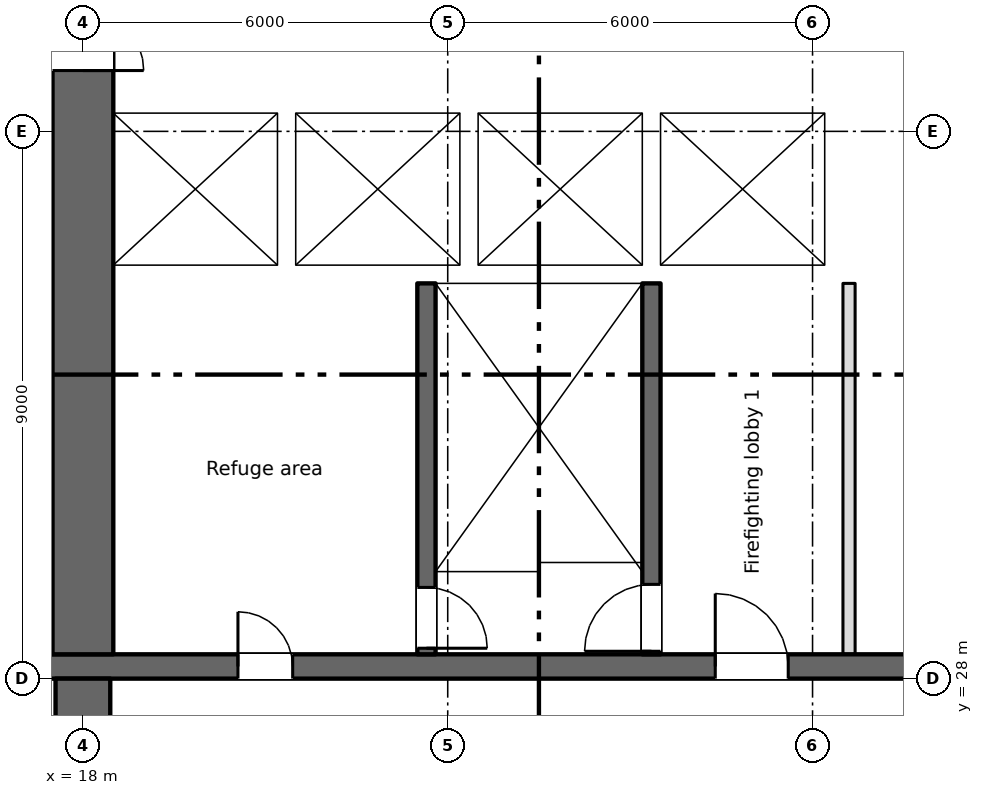
"""IFC4 building model, lengths in metres.
Left out: names, types, materials, properties, quantities, classifications, styles, units other than length and angle.
Written with IfcOpenShell. Run it as: python <this file> out.ifc"""

import sys

from ifc_helpers import new_model, si_unit, direction, frame, frame_2d, origin, place, context, subcontext, project, spatial, rectangle, extrude, element, fill, save


model = new_model("IFC4")
c1 = context("Model", 3, precision=1e-05, world=origin(), true_north=direction((0.0, 1.0)))
c2 = subcontext(c1, "Body", "Model", "MODEL_VIEW")
j1 = project(units=[si_unit("LENGTHUNIT", "METRE"), si_unit("PLANEANGLEUNIT", "RADIAN")], contexts=[c1])
p1 = place(None, origin())
s1 = spatial("IfcSite", under=j1, at=p1, CompositionType="ELEMENT")
p2 = place(p1, origin())
s2 = spatial("IfcBuilding", under=s1, at=p2, CompositionType="ELEMENT")
p3 = place(p2, frame((0.0, 0.0, 90.0)))
s3 = spatial("IfcBuildingStorey", under=s2, at=p3, CompositionType="ELEMENT", Elevation=90.0)
p4 = place(p3, frame((18.0, 1.4, 0.0), z_axis=(0.0, 0.0, 1.0), x_axis=(0.0, 1.0, 0.0)))
e1 = element("IfcWall", 1, at=p4, inside=s3, PredefinedType="SHEAR", context=c2, shape_type="SweptSolid", body=[
    extrude(rectangle(XDim=26.6, YDim=0.9, at=frame_2d((13.3, 0.0))), origin(), (0.0, 0.0, 1.0), 4.2),
])
p5 = place(p4, frame((24.5, 0.0, 0.0)))
e2 = element("IfcOpeningElement", 2, at=p5, cuts=e1, PredefinedType="OPENING", context=c2, shape_type="SweptSolid", body=[
    extrude(rectangle(XDim=1.2, YDim=2.1, at=frame_2d((0.6, 1.05))), frame((0.0, 0.46, 0.0), z_axis=(0.0, -1.0, 0.0), x_axis=(1.0, 0.0, 0.0)), (0.0, 0.0, 1.0), 0.92),
])
p6 = place(p3, frame((6.7, 28.2, 0.0), z_axis=(0.0, 0.0, 1.0), x_axis=(1.0, 0.0, 0.0)))
e3 = element("IfcWall", 3, at=p6, inside=s3, PredefinedType="SHEAR", context=c2, shape_type="SweptSolid", body=[
    extrude(rectangle(XDim=57.8, YDim=0.4, at=frame_2d((28.9, 0.0))), origin(), (0.0, 0.0, 1.0), 4.2),
])
p7 = place(p6, frame((13.85, 0.0, 0.0)))
e4 = element("IfcOpeningElement", 4, at=p7, cuts=e3, PredefinedType="OPENING", context=c2, shape_type="SweptSolid", body=[
    extrude(rectangle(XDim=0.9, YDim=2.1, at=frame_2d((0.45, 1.05))), frame((0.0, 0.21, 0.0), z_axis=(0.0, -1.0, 0.0), x_axis=(1.0, 0.0, 0.0)), (0.0, 0.0, 1.0), 0.42),
])
p8 = place(p6, frame((49.85, 0.0, 0.0)))
e5 = element("IfcOpeningElement", 5, at=p8, cuts=e3, PredefinedType="OPENING", context=c2, shape_type="SweptSolid", body=[
    extrude(rectangle(XDim=0.9, YDim=2.1, at=frame_2d((0.45, 1.05))), frame((0.0, 0.21, 0.0), z_axis=(0.0, -1.0, 0.0), x_axis=(1.0, 0.0, 0.0)), (0.0, 0.0, 1.0), 0.42),
])
p9 = place(p6, frame((1.35, 0.0, 0.0)))
e6 = element("IfcOpeningElement", 6, at=p9, cuts=e3, PredefinedType="OPENING", context=c2, shape_type="SweptSolid", body=[
    extrude(rectangle(XDim=0.9, YDim=2.1, at=frame_2d((0.45, 1.05))), frame((0.0, 0.21, 0.0), z_axis=(0.0, -1.0, 0.0), x_axis=(1.0, 0.0, 0.0)), (0.0, 0.0, 1.0), 0.42),
])
p10 = place(p6, frame((4.7, 0.0, 0.0)))
e7 = element("IfcOpeningElement", 7, at=p10, cuts=e3, PredefinedType="OPENING", context=c2, shape_type="SweptSolid", body=[
    extrude(rectangle(XDim=1.2, YDim=2.1, at=frame_2d((0.6, 1.05))), frame((0.0, 0.21, 0.0), z_axis=(0.0, -1.0, 0.0), x_axis=(1.0, 0.0, 0.0)), (0.0, 0.0, 1.0), 0.42),
])
p11 = place(p6, frame((31.7, 0.0, 0.0)))
e8 = element("IfcOpeningElement", 8, at=p11, cuts=e3, PredefinedType="OPENING", context=c2, shape_type="SweptSolid", body=[
    extrude(rectangle(XDim=1.2, YDim=2.1, at=frame_2d((0.6, 1.05))), frame((0.0, 0.21, 0.0), z_axis=(0.0, -1.0, 0.0), x_axis=(1.0, 0.0, 0.0)), (0.0, 0.0, 1.0), 0.42),
])
p12 = place(p6, frame((55.2, 0.0, 0.0)))
e9 = element("IfcOpeningElement", 9, at=p12, cuts=e3, PredefinedType="OPENING", context=c2, shape_type="SweptSolid", body=[
    extrude(rectangle(XDim=1.2, YDim=2.1, at=frame_2d((0.6, 1.05))), frame((0.0, 0.21, 0.0), z_axis=(0.0, -1.0, 0.0), x_axis=(1.0, 0.0, 0.0)), (0.0, 0.0, 1.0), 0.42),
])
p13 = place(p6, frame((21.7, 0.0, 0.0)))
e10 = element("IfcOpeningElement", 10, at=p13, cuts=e3, PredefinedType="OPENING", context=c2, shape_type="SweptSolid", body=[
    extrude(rectangle(XDim=1.2, YDim=2.1, at=frame_2d((0.6, 1.05))), frame((0.0, 0.21, 0.0), z_axis=(0.0, -1.0, 0.0), x_axis=(1.0, 0.0, 0.0)), (0.0, 0.0, 1.0), 0.42),
])
p14 = place(p6, frame((41.7, 0.0, 0.0)))
e11 = element("IfcOpeningElement", 11, at=p14, cuts=e3, PredefinedType="OPENING", context=c2, shape_type="SweptSolid", body=[
    extrude(rectangle(XDim=1.2, YDim=2.1, at=frame_2d((0.6, 1.05))), frame((0.0, 0.21, 0.0), z_axis=(0.0, -1.0, 0.0), x_axis=(1.0, 0.0, 0.0)), (0.0, 0.0, 1.0), 0.42),
])
p15 = place(p6, frame((24.85, 0.0, 0.0)))
e12 = element("IfcOpeningElement", 12, at=p15, cuts=e3, PredefinedType="OPENING", context=c2, shape_type="SweptSolid", body=[
    extrude(rectangle(XDim=2.4, YDim=2.1, at=frame_2d((1.2, 1.05))), frame((0.0, 0.21, 0.0), z_axis=(0.0, -1.0, 0.0), x_axis=(1.0, 0.0, 0.0)), (0.0, 0.0, 1.0), 0.42),
])
p16 = place(p6, frame((37.35, 0.0, 0.0)))
e13 = element("IfcOpeningElement", 13, at=p16, cuts=e3, PredefinedType="OPENING", context=c2, shape_type="SweptSolid", body=[
    extrude(rectangle(XDim=2.4, YDim=2.1, at=frame_2d((1.2, 1.05))), frame((0.0, 0.21, 0.0), z_axis=(0.0, -1.0, 0.0), x_axis=(1.0, 0.0, 0.0)), (0.0, 0.0, 1.0), 0.42),
])
p17 = place(p6, frame((7.85, 0.0, 0.0)))
e14 = element("IfcOpeningElement", 14, at=p17, cuts=e3, PredefinedType="OPENING", context=c2, shape_type="SweptSolid", body=[
    extrude(rectangle(XDim=2.4, YDim=2.1, at=frame_2d((1.2, 1.05))), frame((0.0, 0.21, 0.0), z_axis=(0.0, -1.0, 0.0), x_axis=(1.0, 0.0, 0.0)), (0.0, 0.0, 1.0), 0.42),
])
p18 = place(p6, frame((28.85, 0.0, 0.0)))
e15 = element("IfcOpeningElement", 15, at=p18, cuts=e3, PredefinedType="OPENING", context=c2, shape_type="SweptSolid", body=[
    extrude(rectangle(XDim=0.9, YDim=2.1, at=frame_2d((0.45, 1.05))), frame((0.0, 0.21, 0.0), z_axis=(0.0, -1.0, 0.0), x_axis=(1.0, 0.0, 0.0)), (0.0, 0.0, 1.0), 0.42),
])
p19 = place(p6, frame((34.85, 0.0, 0.0)))
e16 = element("IfcOpeningElement", 16, at=p19, cuts=e3, PredefinedType="OPENING", context=c2, shape_type="SweptSolid", body=[
    extrude(rectangle(XDim=0.9, YDim=2.1, at=frame_2d((0.45, 1.05))), frame((0.0, 0.21, 0.0), z_axis=(0.0, -1.0, 0.0), x_axis=(1.0, 0.0, 0.0)), (0.0, 0.0, 1.0), 0.42),
])
p20 = place(p3, frame((18.0, 28.4, 0.0), z_axis=(0.0, 0.0, 1.0), x_axis=(0.0, 1.0, 0.0)))
e17 = element("IfcWall", 17, at=p20, inside=s3, PredefinedType="SHEAR", context=c2, shape_type="SweptSolid", body=[
    extrude(rectangle(XDim=16.6, YDim=1.0, at=frame_2d((8.3, 0.0))), origin(), (0.0, 0.0, 1.0), 4.2),
])
p21 = place(p20, frame((9.6, 0.0, 0.0)))
e18 = element("IfcOpeningElement", 18, at=p21, cuts=e17, PredefinedType="OPENING", context=c2, shape_type="SweptSolid", body=[
    extrude(rectangle(XDim=2.0, YDim=2.1, at=frame_2d((1.0, 1.05))), frame((0.0, 0.51, 0.0), z_axis=(0.0, -1.0, 0.0), x_axis=(1.0, 0.0, 0.0)), (0.0, 0.0, 1.0), 1.02),
])
p22 = place(p20, frame((15.25, 0.0, 0.0)))
e19 = element("IfcOpeningElement", 19, at=p22, cuts=e17, PredefinedType="OPENING", context=c2, shape_type="SweptSolid", body=[
    extrude(rectangle(XDim=1.2, YDim=2.1, at=frame_2d((0.6, 1.05))), frame((0.0, 0.51, 0.0), z_axis=(0.0, -1.0, 0.0), x_axis=(1.0, 0.0, 0.0)), (0.0, 0.0, 1.0), 1.02),
])
p23 = place(p3, frame((23.65, 34.5, 0.0), z_axis=(0.0, 0.0, 1.0), x_axis=(0.0, -1.0, 0.0)))
e20 = element("IfcWall", 20, at=p23, inside=s3, PredefinedType="SHEAR", context=c2, shape_type="SweptSolid", body=[
    extrude(rectangle(XDim=6.1, YDim=0.3, at=frame_2d((3.05, 0.0))), origin(), (0.0, 0.0, 1.0), 4.2),
])
p24 = place(p23, frame((5.0, 0.0, 0.0)))
e21 = element("IfcOpeningElement", 21, at=p24, cuts=e20, PredefinedType="OPENING", context=c2, shape_type="SweptSolid", body=[
    extrude(rectangle(XDim=1.0, YDim=2.1, at=frame_2d((0.5, 1.05))), frame((0.0, 0.16, 0.0), z_axis=(0.0, -1.0, 0.0), x_axis=(1.0, 0.0, 0.0)), (0.0, 0.0, 1.0), 0.32),
])
p25 = place(p3, frame((27.35, 28.4, 0.0), z_axis=(0.0, 0.0, 1.0), x_axis=(0.0, 1.0, 0.0)))
e22 = element("IfcWall", 22, at=p25, inside=s3, PredefinedType="SHEAR", context=c2, shape_type="SweptSolid", body=[
    extrude(rectangle(XDim=6.1, YDim=0.3, at=frame_2d((3.05, 0.0))), origin(), (0.0, 0.0, 1.0), 4.2),
])
p26 = place(p25, frame((0.05, 0.0, 0.0)))
e23 = element("IfcOpeningElement", 23, at=p26, cuts=e22, PredefinedType="OPENING", context=c2, shape_type="SweptSolid", body=[
    extrude(rectangle(XDim=1.1, YDim=2.1, at=frame_2d((0.55, 1.05))), frame((0.0, 0.16, 0.0), z_axis=(0.0, -1.0, 0.0), x_axis=(1.0, 0.0, 0.0)), (0.0, 0.0, 1.0), 0.32),
])
p27 = place(p3, frame((18.5, 34.65, 0.0), z_axis=(0.0, 0.0, 1.0), x_axis=(1.0, 0.0, 0.0)))
e24 = element("IfcWall", 24, at=p27, inside=s3, PredefinedType="SHEAR", context=c2, shape_type="SweptSolid", body=[
    extrude(rectangle(XDim=12.2, YDim=0.3, at=frame_2d((6.1, 0.0))), origin(), (0.0, 0.0, 1.0), 4.2),
])
p28 = place(p27, frame((9.8, 0.0, 0.0)))
e25 = element("IfcOpeningElement", 25, at=p28, cuts=e24, PredefinedType="OPENING", context=c2, shape_type="SweptSolid", body=[
    extrude(rectangle(XDim=1.1, YDim=2.1, at=frame_2d((0.55, 1.05))), frame((0.0, 0.16, 0.0), z_axis=(0.0, -1.0, 0.0), x_axis=(1.0, 0.0, 0.0)), (0.0, 0.0, 1.0), 0.32),
])
p29 = place(p3, frame((18.5, 37.45, 0.0), z_axis=(0.0, 0.0, 1.0), x_axis=(1.0, 0.0, 0.0)))
e26 = element("IfcWall", 26, at=p29, inside=s3, PredefinedType="SHEAR", context=c2, shape_type="SweptSolid", body=[
    extrude(rectangle(XDim=12.2, YDim=0.3, at=frame_2d((6.1, 0.0))), origin(), (0.0, 0.0, 1.0), 4.2),
])
p30 = place(p29, frame((0.8, 0.0, 0.0)))
e27 = element("IfcOpeningElement", 27, at=p30, cuts=e26, PredefinedType="OPENING", context=c2, shape_type="SweptSolid", body=[
    extrude(rectangle(XDim=1.1, YDim=2.1, at=frame_2d((0.55, 1.05))), frame((0.0, 0.16, 0.0), z_axis=(0.0, -1.0, 0.0), x_axis=(1.0, 0.0, 0.0)), (0.0, 0.0, 1.0), 0.32),
])
p31 = place(p29, frame((3.8, 0.0, 0.0)))
e28 = element("IfcOpeningElement", 28, at=p31, cuts=e26, PredefinedType="OPENING", context=c2, shape_type="SweptSolid", body=[
    extrude(rectangle(XDim=1.1, YDim=2.1, at=frame_2d((0.55, 1.05))), frame((0.0, 0.16, 0.0), z_axis=(0.0, -1.0, 0.0), x_axis=(1.0, 0.0, 0.0)), (0.0, 0.0, 1.0), 0.32),
])
p32 = place(p29, frame((6.8, 0.0, 0.0)))
e29 = element("IfcOpeningElement", 29, at=p32, cuts=e26, PredefinedType="OPENING", context=c2, shape_type="SweptSolid", body=[
    extrude(rectangle(XDim=1.1, YDim=2.1, at=frame_2d((0.55, 1.05))), frame((0.0, 0.16, 0.0), z_axis=(0.0, -1.0, 0.0), x_axis=(1.0, 0.0, 0.0)), (0.0, 0.0, 1.0), 0.32),
])
p33 = place(p3, frame((27.35, 34.8, 0.0), z_axis=(0.0, 0.0, 1.0), x_axis=(0.0, 1.0, 0.0)))
e30 = element("IfcWall", 30, at=p33, inside=s3, PredefinedType="SHEAR", context=c2, shape_type="SweptSolid", body=[
    extrude(rectangle(XDim=2.5, YDim=0.3, at=frame_2d((1.25, 0.0))), origin(), (0.0, 0.0, 1.0), 4.2),
])
p34 = place(p3, frame((30.45, 34.8, 0.0), z_axis=(0.0, 0.0, 1.0), x_axis=(0.0, 1.0, 0.0)))
e31 = element("IfcWall", 31, at=p34, inside=s3, PredefinedType="SHEAR", context=c2, shape_type="SweptSolid", body=[
    extrude(rectangle(XDim=2.5, YDim=0.5, at=frame_2d((1.25, 0.0))), origin(), (0.0, 0.0, 1.0), 4.2),
])
for number, where, z_axis, x_axis in (
    (32, (21.35, 34.8, 0.0), (0.0, 0.0, 1.0), (0.0, 1.0, 0.0)),
    (33, (24.35, 34.8, 0.0), (0.0, 0.0, 1.0), (0.0, 1.0, 0.0)),
):
    element("IfcWall", number, at=place(p3, frame(where, z_axis=z_axis, x_axis=x_axis)), inside=s3, PredefinedType="SHEAR", context=c2, shape_type="SweptSolid", body=[
        extrude(rectangle(XDim=2.5, YDim=0.3, at=frame_2d((1.25, 0.0))), origin(), (0.0, 0.0, 1.0), 4.2),
    ])
p35 = place(p3, frame((30.6, 28.4, 0.0), z_axis=(0.0, 0.0, 1.0), x_axis=(0.0, 1.0, 0.0)))
e34 = element("IfcWall", 34, at=p35, inside=s3, PredefinedType="PARTITIONING", context=c2, shape_type="SweptSolid", body=[
    extrude(rectangle(XDim=6.1, YDim=0.2, at=frame_2d((3.05, 0.0))), origin(), (0.0, 0.0, 1.0), 4.2),
])
p36 = place(p7, origin())
e35 = element("IfcDoor", 35, at=p36, inside=s3, OperationType="SINGLE_SWING_LEFT", PredefinedType="DOOR", context=c2, shape_type="SweptSolid", body=[
    extrude(rectangle(XDim=0.9, YDim=2.1, at=frame_2d((0.45, 1.05))), frame((0.0, 0.025, 0.0), z_axis=(0.0, -1.0, 0.0), x_axis=(1.0, 0.0, 0.0)), (0.0, 0.0, 1.0), 0.05),
])
fill(e4, e35)
p37 = place(p24, origin())
e36 = element("IfcDoor", 36, at=p37, inside=s3, OperationType="SINGLE_SWING_RIGHT", PredefinedType="DOOR", context=c2, shape_type="SweptSolid", body=[
    extrude(rectangle(XDim=1.0, YDim=2.1, at=frame_2d((0.5, 1.05))), frame((0.0, 0.025, 0.0), z_axis=(0.0, -1.0, 0.0), x_axis=(1.0, 0.0, 0.0)), (0.0, 0.0, 1.0), 0.05),
])
fill(e21, e36)
p38 = place(p30, origin())
e37 = element("IfcDoor", 37, at=p38, inside=s3, OperationType="SLIDING_TO_LEFT", PredefinedType="DOOR", context=c2, shape_type="SweptSolid", body=[
    extrude(rectangle(XDim=1.1, YDim=2.1, at=frame_2d((0.55, 1.05))), frame((0.0, 0.025, 0.0), z_axis=(0.0, -1.0, 0.0), x_axis=(1.0, 0.0, 0.0)), (0.0, 0.0, 1.0), 0.05),
])
fill(e27, e37)
p39 = place(p31, origin())
e38 = element("IfcDoor", 38, at=p39, inside=s3, OperationType="SLIDING_TO_LEFT", PredefinedType="DOOR", context=c2, shape_type="SweptSolid", body=[
    extrude(rectangle(XDim=1.1, YDim=2.1, at=frame_2d((0.55, 1.05))), frame((0.0, 0.025, 0.0), z_axis=(0.0, -1.0, 0.0), x_axis=(1.0, 0.0, 0.0)), (0.0, 0.0, 1.0), 0.05),
])
fill(e28, e38)
p40 = place(p32, origin())
e39 = element("IfcDoor", 39, at=p40, inside=s3, OperationType="SLIDING_TO_LEFT", PredefinedType="DOOR", context=c2, shape_type="SweptSolid", body=[
    extrude(rectangle(XDim=1.1, YDim=2.1, at=frame_2d((0.55, 1.05))), frame((0.0, 0.025, 0.0), z_axis=(0.0, -1.0, 0.0), x_axis=(1.0, 0.0, 0.0)), (0.0, 0.0, 1.0), 0.05),
])
fill(e29, e39)
p41 = place(p28, origin())
e40 = element("IfcDoor", 40, at=p41, inside=s3, OperationType="SLIDING_TO_LEFT", PredefinedType="DOOR", context=c2, shape_type="SweptSolid", body=[
    extrude(rectangle(XDim=1.1, YDim=2.1, at=frame_2d((0.55, 1.05))), frame((0.0, 0.025, 0.0), z_axis=(0.0, -1.0, 0.0), x_axis=(1.0, 0.0, 0.0)), (0.0, 0.0, 1.0), 0.05),
])
fill(e25, e40)
p42 = place(p26, origin())
e41 = element("IfcDoor", 41, at=p42, inside=s3, OperationType="SINGLE_SWING_LEFT", PredefinedType="DOOR", context=c2, shape_type="SweptSolid", body=[
    extrude(rectangle(XDim=1.1, YDim=2.1, at=frame_2d((0.55, 1.05))), frame((0.0, 0.025, 0.0), z_axis=(0.0, -1.0, 0.0), x_axis=(1.0, 0.0, 0.0)), (0.0, 0.0, 1.0), 0.05),
])
fill(e23, e41)
p43 = place(p13, origin())
e42 = element("IfcDoor", 42, at=p43, inside=s3, OperationType="SINGLE_SWING_LEFT", PredefinedType="DOOR", context=c2, shape_type="SweptSolid", body=[
    extrude(rectangle(XDim=1.2, YDim=2.1, at=frame_2d((0.6, 1.05))), frame((0.0, 0.025, 0.0), z_axis=(0.0, -1.0, 0.0), x_axis=(1.0, 0.0, 0.0)), (0.0, 0.0, 1.0), 0.05),
])
fill(e10, e42)
p44 = place(p21, origin())
e43 = element("IfcDoor", 43, at=p44, inside=s3, OperationType="DOUBLE_DOOR_SINGLE_SWING", PredefinedType="DOOR", context=c2, shape_type="SweptSolid", body=[
    extrude(rectangle(XDim=2.0, YDim=2.1, at=frame_2d((1.0, 1.05))), frame((0.0, 0.025, 0.0), z_axis=(0.0, -1.0, 0.0), x_axis=(1.0, 0.0, 0.0)), (0.0, 0.0, 1.0), 0.05),
])
fill(e18, e43)
save(model, sys.argv[1])
